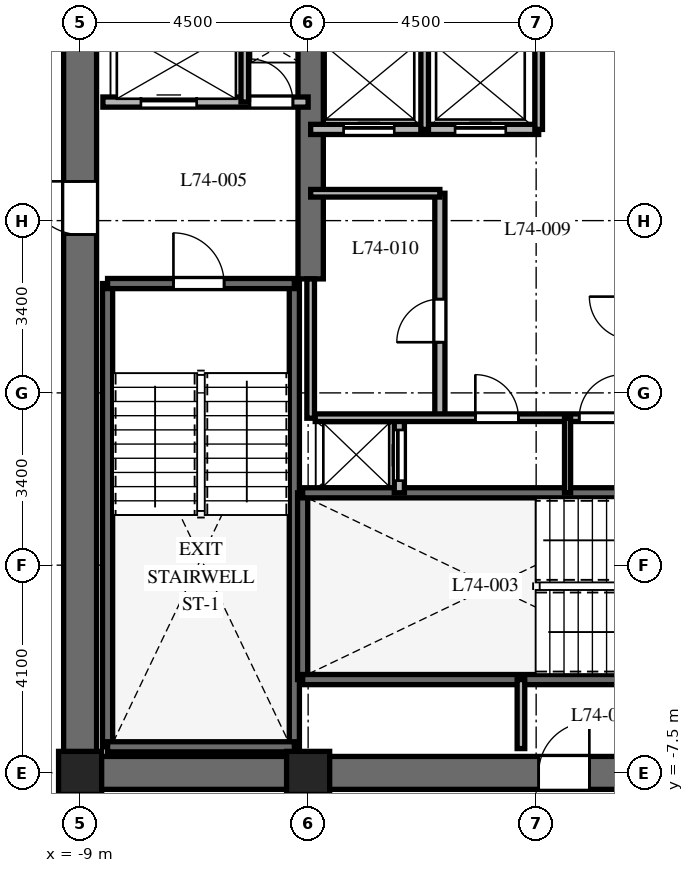
"""IFC4 building model, lengths in metres.
Left out: names, types, materials, properties, quantities, classifications, styles, units other than length and angle.
Written with IfcOpenShell. Run it as: python <this file> out.ifc"""

import sys

from ifc_helpers import new_model, si_unit, direction, frame, frame_2d, origin, origin_2d, place, context, subcontext, project, spatial, rectangle, extrude, element, fill, save


model = new_model("IFC4")
c1 = context("Model", 3, precision=1e-05, world=origin(), true_north=direction((0.0, 1.0)))
c2 = subcontext(c1, "Body", "Model", "MODEL_VIEW")
j1 = project(units=[si_unit("LENGTHUNIT", "METRE"), si_unit("PLANEANGLEUNIT", "RADIAN")], contexts=[c1])
p1 = place(None, origin())
s1 = spatial("IfcSite", under=j1, at=p1, CompositionType="ELEMENT")
p2 = place(p1, origin())
s2 = spatial("IfcBuilding", under=s1, at=p2, CompositionType="ELEMENT")
p3 = place(p2, frame((0.0, 0.0, 297.6)))
s3 = spatial("IfcBuildingStorey", under=s2, at=p3, CompositionType="ELEMENT", Elevation=297.6)
p4 = place(p3, frame((-9.325, -7.5, 0.0), z_axis=(0.0, 0.0, 1.0), x_axis=(1.0, 0.0, 0.0)))
e1 = element("IfcWall", 1, at=p4, inside=s3, PredefinedType="SHEAR", context=c2, shape_type="SweptSolid", body=[
    extrude(rectangle(XDim=18.65, YDim=0.65, at=frame_2d((9.325, 0.0))), origin(), (0.0, 0.0, 1.0), 3.9),
])
p5 = place(p4, frame((9.375, 0.0, 0.0)))
e2 = element("IfcOpeningElement", 2, at=p5, cuts=e1, PredefinedType="OPENING", context=c2, shape_type="SweptSolid", body=[
    extrude(rectangle(XDim=1.0, YDim=2.15, at=frame_2d((0.5, 1.075))), frame((0.0, 0.335, 0.0), z_axis=(0.0, -1.0, 0.0), x_axis=(1.0, 0.0, 0.0)), (0.0, 0.0, 1.0), 0.67),
])
p6 = place(p3, frame((-9.0, -7.175, 0.0), z_axis=(0.0, 0.0, 1.0), x_axis=(0.0, 1.0, 0.0)))
e3 = element("IfcWall", 3, at=p6, inside=s3, PredefinedType="SHEAR", context=c2, shape_type="SweptSolid", body=[
    extrude(rectangle(XDim=14.35, YDim=0.65, at=frame_2d((7.175, 0.0))), origin(), (0.0, 0.0, 1.0), 3.9),
])
p7 = place(p6, frame((10.3, 0.0, 0.0)))
e4 = element("IfcOpeningElement", 4, at=p7, cuts=e3, PredefinedType="OPENING", context=c2, shape_type="SweptSolid", body=[
    extrude(rectangle(XDim=1.05, YDim=2.15, at=frame_2d((0.525, 1.075))), frame((0.0, 0.335, 0.0), z_axis=(0.0, -1.0, 0.0), x_axis=(1.0, 0.0, 0.0)), (0.0, 0.0, 1.0), 0.67),
])
p8 = place(p3, frame((-4.45, 2.25, 0.0), z_axis=(0.0, 0.0, 1.0), x_axis=(0.0, 1.0, 0.0)))
e5 = element("IfcWall", 5, at=p8, inside=s3, PredefinedType="SHEAR", context=c2, shape_type="SweptSolid", body=[
    extrude(rectangle(XDim=4.925, YDim=0.5, at=frame_2d((2.462, 0.0))), origin(), (0.0, 0.0, 1.0), 3.9),
])
for number, where, z_axis, x_axis in (
    (6, (-8.458, -6.985, 0.0), (0.0, 0.0, 1.0), (0.0, 1.0, 0.0)),
    (7, (-4.772, -6.985, 0.0), (0.0, 0.0, 1.0), (0.0, 1.0, 0.0)),
):
    element("IfcWall", number, at=place(p3, frame(where, z_axis=z_axis, x_axis=x_axis)), inside=s3, PredefinedType="SHEAR", context=c2, shape_type="SweptSolid", body=[
        extrude(rectangle(XDim=9.143, YDim=0.2, at=frame_2d((4.572, 0.0))), origin(), (0.0, 0.0, 1.0), 3.9),
    ])
p9 = place(p3, frame((-8.458, -6.985, 0.0), z_axis=(0.0, 0.0, 1.0), x_axis=(1.0, 0.0, 0.0)))
e8 = element("IfcWall", 8, at=p9, inside=s3, PredefinedType="SHEAR", context=c2, shape_type="SweptSolid", body=[
    extrude(rectangle(XDim=3.686, YDim=0.2, at=frame_2d((1.843, 0.0))), origin(), (0.0, 0.0, 1.0), 3.9),
])
p10 = place(p3, frame((-8.458, 2.158, 0.0), z_axis=(0.0, 0.0, 1.0), x_axis=(1.0, 0.0, 0.0)))
e9 = element("IfcWall", 9, at=p10, inside=s3, PredefinedType="SHEAR", context=c2, shape_type="SweptSolid", body=[
    extrude(rectangle(XDim=3.686, YDim=0.2, at=frame_2d((1.843, 0.0))), origin(), (0.0, 0.0, 1.0), 3.9),
])
p11 = place(p10, frame((1.3, 0.0, 0.0)))
e10 = element("IfcOpeningElement", 10, at=p11, cuts=e9, PredefinedType="OPENING", context=c2, shape_type="SweptSolid", body=[
    extrude(rectangle(XDim=1.0, YDim=2.15, at=frame_2d((0.5, 1.075))), frame((0.0, 0.11, 0.0), z_axis=(0.0, -1.0, 0.0), x_axis=(1.0, 0.0, 0.0)), (0.0, 0.0, 1.0), 0.22),
])
p12 = place(p3, frame((-4.608, -5.658, 0.0), z_axis=(0.0, 0.0, 1.0), x_axis=(0.0, 1.0, 0.0)))
e11 = element("IfcWall", 11, at=p12, inside=s3, PredefinedType="SHEAR", context=c2, shape_type="SweptSolid", body=[
    extrude(rectangle(XDim=3.686, YDim=0.2, at=frame_2d((1.843, 0.0))), origin(), (0.0, 0.0, 1.0), 3.9),
])
p13 = place(p3, frame((-4.608, -5.658, 0.0), z_axis=(0.0, 0.0, 1.0), x_axis=(1.0, 0.0, 0.0)))
e12 = element("IfcWall", 12, at=p13, inside=s3, PredefinedType="SHEAR", context=c2, shape_type="SweptSolid", body=[
    extrude(rectangle(XDim=9.166, YDim=0.2, at=frame_2d((4.583, 0.0))), origin(), (0.0, 0.0, 1.0), 3.9),
])
p14 = place(p13, frame((7.45, 0.0, 0.0)))
e13 = element("IfcOpeningElement", 13, at=p14, cuts=e12, PredefinedType="OPENING", context=c2, shape_type="SweptSolid", body=[
    extrude(rectangle(XDim=1.0, YDim=2.15, at=frame_2d((0.5, 1.075))), frame((0.0, 0.11, 0.0), z_axis=(0.0, -1.0, 0.0), x_axis=(1.0, 0.0, 0.0)), (0.0, 0.0, 1.0), 0.22),
])
p15 = place(p3, frame((-4.608, -1.972, 0.0), z_axis=(0.0, 0.0, 1.0), x_axis=(1.0, 0.0, 0.0)))
e14 = element("IfcWall", 14, at=p15, inside=s3, PredefinedType="SHEAR", context=c2, shape_type="SweptSolid", body=[
    extrude(rectangle(XDim=9.166, YDim=0.2, at=frame_2d((4.583, 0.0))), origin(), (0.0, 0.0, 1.0), 3.9),
])
for number, where, z_axis, x_axis in (
    (15, (-9.0, -7.5, 0.0), (0.0, 0.0, 1.0), (1.0, 0.0, 0.0)),
    (16, (-4.5, -7.5, 0.0), (0.0, 0.0, 1.0), (1.0, 0.0, 0.0)),
):
    element("IfcColumn", number, at=place(p3, frame(where, z_axis=z_axis, x_axis=x_axis)), inside=s3, PredefinedType="COLUMN", context=c2, shape_type="SweptSolid", body=[
        extrude(rectangle(XDim=0.85, YDim=0.85, at=origin_2d()), origin(), (0.0, 0.0, 1.0), 3.9),
    ])
p16 = place(p3, frame((-0.3, -7.02, 0.0), z_axis=(0.0, 0.0, 1.0), x_axis=(0.0, 1.0, 0.0)))
e17 = element("IfcWall", 17, at=p16, inside=s3, PredefinedType="PARTITIONING", context=c2, shape_type="SweptSolid", body=[
    extrude(rectangle(XDim=1.362, YDim=0.15, at=frame_2d((0.681, 0.0))), origin(), (0.0, 0.0, 1.0), 3.6),
])
p17 = place(p3, frame((-8.55, 5.74, 0.0), z_axis=(0.0, 0.0, 1.0), x_axis=(1.0, 0.0, 0.0)))
e18 = element("IfcWall", 18, at=p17, inside=s3, PredefinedType="PARTITIONING", context=c2, shape_type="SweptSolid", body=[
    extrude(rectangle(XDim=4.05, YDim=0.2, at=frame_2d((2.025, 0.0))), origin(), (0.0, 0.0, 1.0), 3.6),
])
p18 = place(p17, frame((0.75, 0.0, 0.0)))
e19 = element("IfcOpeningElement", 19, at=p18, cuts=e18, PredefinedType="OPENING", context=c2, shape_type="SweptSolid", body=[
    extrude(rectangle(XDim=1.1, YDim=2.2, at=frame_2d((0.55, 1.1))), frame((0.0, 0.11, 0.0), z_axis=(0.0, -1.0, 0.0), x_axis=(1.0, 0.0, 0.0)), (0.0, 0.0, 1.0), 0.22),
])
p19 = place(p17, frame((2.9, 0.0, 0.0)))
e20 = element("IfcOpeningElement", 20, at=p19, cuts=e18, PredefinedType="OPENING", context=c2, shape_type="SweptSolid", body=[
    extrude(rectangle(XDim=0.85, YDim=2.03, at=frame_2d((0.425, 1.015))), frame((0.0, 0.11, 0.0), z_axis=(0.0, -1.0, 0.0), x_axis=(1.0, 0.0, 0.0)), (0.0, 0.0, 1.0), 0.22),
])
p20 = place(p3, frame((-5.75, 5.74, 0.0), z_axis=(0.0, 0.0, 1.0), x_axis=(0.0, 1.0, 0.0)))
e21 = element("IfcWall", 21, at=p20, inside=s3, PredefinedType="PARTITIONING", context=c2, shape_type="SweptSolid", body=[
    extrude(rectangle(XDim=1.41, YDim=0.15, at=frame_2d((0.705, 0.0))), origin(), (0.0, 0.0, 1.0), 3.6),
])
p21 = place(p3, frame((-2.7, -1.972, 0.0), z_axis=(0.0, 0.0, 1.0), x_axis=(0.0, 1.0, 0.0)))
e22 = element("IfcWall", 22, at=p21, inside=s3, PredefinedType="PARTITIONING", context=c2, shape_type="SweptSolid", body=[
    extrude(rectangle(XDim=1.472, YDim=0.2, at=frame_2d((0.736, 0.0))), origin(), (0.0, 0.0, 1.0), 3.6),
])
p22 = place(p21, frame((0.24, 0.0, 0.0)))
e23 = element("IfcOpeningElement", 23, at=p22, cuts=e22, PredefinedType="OPENING", context=c2, shape_type="SweptSolid", body=[
    extrude(rectangle(XDim=1.0, YDim=2.2, at=frame_2d((0.5, 1.1))), frame((0.0, 0.11, 0.0), z_axis=(0.0, -1.0, 0.0), x_axis=(1.0, 0.0, 0.0)), (0.0, 0.0, 1.0), 0.22),
])
p23 = place(p3, frame((-4.45, 5.2, 0.0), z_axis=(0.0, 0.0, 1.0), x_axis=(1.0, 0.0, 0.0)))
e24 = element("IfcWall", 24, at=p23, inside=s3, PredefinedType="PARTITIONING", context=c2, shape_type="SweptSolid", body=[
    extrude(rectangle(XDim=4.5, YDim=0.2, at=frame_2d((2.25, 0.0))), origin(), (0.0, 0.0, 1.0), 3.6),
])
p24 = place(p23, frame((0.65, 0.0, 0.0)))
e25 = element("IfcOpeningElement", 25, at=p24, cuts=e24, PredefinedType="OPENING", context=c2, shape_type="SweptSolid", body=[
    extrude(rectangle(XDim=1.0, YDim=2.2, at=frame_2d((0.5, 1.1))), frame((0.0, 0.11, 0.0), z_axis=(0.0, -1.0, 0.0), x_axis=(1.0, 0.0, 0.0)), (0.0, 0.0, 1.0), 0.22),
])
p25 = place(p23, frame((2.85, 0.0, 0.0)))
e26 = element("IfcOpeningElement", 26, at=p25, cuts=e24, PredefinedType="OPENING", context=c2, shape_type="SweptSolid", body=[
    extrude(rectangle(XDim=1.0, YDim=2.2, at=frame_2d((0.5, 1.1))), frame((0.0, 0.11, 0.0), z_axis=(0.0, -1.0, 0.0), x_axis=(1.0, 0.0, 0.0)), (0.0, 0.0, 1.0), 0.22),
])
p26 = place(p3, frame((-2.2, 5.2, 0.0), z_axis=(0.0, 0.0, 1.0), x_axis=(0.0, 1.0, 0.0)))
e27 = element("IfcWall", 27, at=p26, inside=s3, PredefinedType="PARTITIONING", context=c2, shape_type="SweptSolid", body=[
    extrude(rectangle(XDim=1.85, YDim=0.15, at=frame_2d((0.925, 0.0))), origin(), (0.0, 0.0, 1.0), 3.6),
])
p27 = place(p3, frame((0.05, 5.2, 0.0), z_axis=(0.0, 0.0, 1.0), x_axis=(0.0, 1.0, 0.0)))
e28 = element("IfcWall", 28, at=p27, inside=s3, PredefinedType="PARTITIONING", context=c2, shape_type="SweptSolid", body=[
    extrude(rectangle(XDim=1.95, YDim=0.15, at=frame_2d((0.975, 0.0))), origin(), (0.0, 0.0, 1.0), 3.6),
])
p28 = place(p3, frame((-4.45, -0.5, 0.0), z_axis=(0.0, 0.0, 1.0), x_axis=(0.0, 1.0, 0.0)))
e29 = element("IfcWall", 29, at=p28, inside=s3, PredefinedType="PARTITIONING", context=c2, shape_type="SweptSolid", body=[
    extrude(rectangle(XDim=2.75, YDim=0.15, at=frame_2d((1.375, 0.0))), origin(), (0.0, 0.0, 1.0), 3.6),
])
p29 = place(p3, frame((-1.9, -0.5, 0.0), z_axis=(0.0, 0.0, 1.0), x_axis=(0.0, 1.0, 0.0)))
e30 = element("IfcWall", 30, at=p29, inside=s3, PredefinedType="PARTITIONING", context=c2, shape_type="SweptSolid", body=[
    extrude(rectangle(XDim=4.44, YDim=0.2, at=frame_2d((2.22, 0.0))), origin(), (0.0, 0.0, 1.0), 3.6),
])
p30 = place(p29, frame((1.5, 0.0, 0.0)))
e31 = element("IfcOpeningElement", 31, at=p30, cuts=e30, PredefinedType="OPENING", context=c2, shape_type="SweptSolid", body=[
    extrude(rectangle(XDim=0.85, YDim=2.03, at=frame_2d((0.425, 1.015))), frame((0.0, 0.11, 0.0), z_axis=(0.0, -1.0, 0.0), x_axis=(1.0, 0.0, 0.0)), (0.0, 0.0, 1.0), 0.22),
])
p31 = place(p3, frame((-4.45, 3.94, 0.0), z_axis=(0.0, 0.0, 1.0), x_axis=(1.0, 0.0, 0.0)))
e32 = element("IfcWall", 32, at=p31, inside=s3, PredefinedType="PARTITIONING", context=c2, shape_type="SweptSolid", body=[
    extrude(rectangle(XDim=2.55, YDim=0.15, at=frame_2d((1.275, 0.0))), origin(), (0.0, 0.0, 1.0), 3.6),
])
p32 = place(p3, frame((-4.36, -0.49, 0.0), z_axis=(0.0, 0.0, 1.0), x_axis=(1.0, 0.0, 0.0)))
e33 = element("IfcWall", 33, at=p32, inside=s3, PredefinedType="PARTITIONING", context=c2, shape_type="SweptSolid", body=[
    extrude(rectangle(XDim=8.72, YDim=0.15, at=frame_2d((4.36, 0.0))), origin(), (0.0, 0.0, 1.0), 3.6),
])
p33 = place(p32, frame((3.16, 0.0, 0.0)))
e34 = element("IfcOpeningElement", 34, at=p33, cuts=e33, PredefinedType="OPENING", context=c2, shape_type="SweptSolid", body=[
    extrude(rectangle(XDim=0.85, YDim=2.03, at=frame_2d((0.425, 1.015))), frame((0.0, 0.085, 0.0), z_axis=(0.0, -1.0, 0.0), x_axis=(1.0, 0.0, 0.0)), (0.0, 0.0, 1.0), 0.17),
])
p34 = place(p32, frame((5.21, 0.0, 0.0)))
e35 = element("IfcOpeningElement", 35, at=p34, cuts=e33, PredefinedType="OPENING", context=c2, shape_type="SweptSolid", body=[
    extrude(rectangle(XDim=0.85, YDim=2.03, at=frame_2d((0.425, 1.015))), frame((0.0, 0.085, 0.0), z_axis=(0.0, -1.0, 0.0), x_axis=(1.0, 0.0, 0.0)), (0.0, 0.0, 1.0), 0.17),
])
p35 = place(p3, frame((0.62, -1.972, 0.0), z_axis=(0.0, 0.0, 1.0), x_axis=(0.0, 1.0, 0.0)))
e36 = element("IfcWall", 36, at=p35, inside=s3, PredefinedType="PARTITIONING", context=c2, shape_type="SweptSolid", body=[
    extrude(rectangle(XDim=1.472, YDim=0.12, at=frame_2d((0.736, 0.0))), origin(), (0.0, 0.0, 1.0), 3.6),
])
p36 = place(p11, origin())
e37 = element("IfcDoor", 37, at=p36, inside=s3, OperationType="SINGLE_SWING_LEFT", PredefinedType="DOOR", context=c2, shape_type="SweptSolid", body=[
    extrude(rectangle(XDim=1.0, YDim=2.15, at=frame_2d((0.5, 1.075))), frame((0.0, 0.025, 0.0), z_axis=(0.0, -1.0, 0.0), x_axis=(1.0, 0.0, 0.0)), (0.0, 0.0, 1.0), 0.05),
])
fill(e10, e37)
p37 = place(p5, origin())
e38 = element("IfcDoor", 38, at=p37, inside=s3, OperationType="SINGLE_SWING_RIGHT", PredefinedType="DOOR", context=c2, shape_type="SweptSolid", body=[
    extrude(rectangle(XDim=1.0, YDim=2.15, at=frame_2d((0.5, 1.075))), frame((0.0, 0.025, 0.0), z_axis=(0.0, -1.0, 0.0), x_axis=(1.0, 0.0, 0.0)), (0.0, 0.0, 1.0), 0.05),
])
fill(e2, e38)
p38 = place(p7, origin())
e39 = element("IfcDoor", 39, at=p38, inside=s3, OperationType="SINGLE_SWING_RIGHT", PredefinedType="DOOR", context=c2, shape_type="SweptSolid", body=[
    extrude(rectangle(XDim=1.05, YDim=2.15, at=frame_2d((0.525, 1.075))), frame((0.0, 0.025, 0.0), z_axis=(0.0, -1.0, 0.0), x_axis=(1.0, 0.0, 0.0)), (0.0, 0.0, 1.0), 0.05),
])
fill(e4, e39)
p39 = place(p18, origin())
e40 = element("IfcDoor", 40, at=p39, inside=s3, OperationType="SLIDING_TO_LEFT", PredefinedType="DOOR", context=c2, shape_type="SweptSolid", body=[
    extrude(rectangle(XDim=1.1, YDim=2.2, at=frame_2d((0.55, 1.1))), frame((0.0, 0.025, 0.0), z_axis=(0.0, -1.0, 0.0), x_axis=(1.0, 0.0, 0.0)), (0.0, 0.0, 1.0), 0.05),
])
fill(e19, e40)
p40 = place(p19, origin())
e41 = element("IfcDoor", 41, at=p40, inside=s3, OperationType="SINGLE_SWING_LEFT", PredefinedType="DOOR", context=c2, shape_type="SweptSolid", body=[
    extrude(rectangle(XDim=0.85, YDim=2.03, at=frame_2d((0.425, 1.015))), frame((0.0, 0.025, 0.0), z_axis=(0.0, -1.0, 0.0), x_axis=(1.0, 0.0, 0.0)), (0.0, 0.0, 1.0), 0.05),
])
fill(e20, e41)
p41 = place(p22, origin())
e42 = element("IfcDoor", 42, at=p41, inside=s3, OperationType="SLIDING_TO_LEFT", PredefinedType="DOOR", context=c2, shape_type="SweptSolid", body=[
    extrude(rectangle(XDim=1.0, YDim=2.2, at=frame_2d((0.5, 1.1))), frame((0.0, 0.025, 0.0), z_axis=(0.0, -1.0, 0.0), x_axis=(1.0, 0.0, 0.0)), (0.0, 0.0, 1.0), 0.05),
])
fill(e23, e42)
p42 = place(p24, origin())
e43 = element("IfcDoor", 43, at=p42, inside=s3, OperationType="SLIDING_TO_LEFT", PredefinedType="DOOR", context=c2, shape_type="SweptSolid", body=[
    extrude(rectangle(XDim=1.0, YDim=2.2, at=frame_2d((0.5, 1.1))), frame((0.0, 0.025, 0.0), z_axis=(0.0, -1.0, 0.0), x_axis=(1.0, 0.0, 0.0)), (0.0, 0.0, 1.0), 0.05),
])
fill(e25, e43)
p43 = place(p25, origin())
e44 = element("IfcDoor", 44, at=p43, inside=s3, OperationType="SLIDING_TO_RIGHT", PredefinedType="DOOR", context=c2, shape_type="SweptSolid", body=[
    extrude(rectangle(XDim=1.0, YDim=2.2, at=frame_2d((0.5, 1.1))), frame((0.0, 0.025, 0.0), z_axis=(0.0, -1.0, 0.0), x_axis=(1.0, 0.0, 0.0)), (0.0, 0.0, 1.0), 0.05),
])
fill(e26, e44)
p44 = place(p30, origin())
e45 = element("IfcDoor", 45, at=p44, inside=s3, OperationType="SINGLE_SWING_LEFT", PredefinedType="DOOR", context=c2, shape_type="SweptSolid", body=[
    extrude(rectangle(XDim=0.85, YDim=2.03, at=frame_2d((0.425, 1.015))), frame((0.0, 0.025, 0.0), z_axis=(0.0, -1.0, 0.0), x_axis=(1.0, 0.0, 0.0)), (0.0, 0.0, 1.0), 0.05),
])
fill(e31, e45)
p45 = place(p33, origin())
e46 = element("IfcDoor", 46, at=p45, inside=s3, OperationType="SINGLE_SWING_LEFT", PredefinedType="DOOR", context=c2, shape_type="SweptSolid", body=[
    extrude(rectangle(XDim=0.85, YDim=2.03, at=frame_2d((0.425, 1.015))), frame((0.0, 0.025, 0.0), z_axis=(0.0, -1.0, 0.0), x_axis=(1.0, 0.0, 0.0)), (0.0, 0.0, 1.0), 0.05),
])
fill(e34, e46)
p46 = place(p34, origin())
e47 = element("IfcDoor", 47, at=p46, inside=s3, OperationType="SINGLE_SWING_RIGHT", PredefinedType="DOOR", context=c2, shape_type="SweptSolid", body=[
    extrude(rectangle(XDim=0.85, YDim=2.03, at=frame_2d((0.425, 1.015))), frame((0.0, 0.025, 0.0), z_axis=(0.0, -1.0, 0.0), x_axis=(1.0, 0.0, 0.0)), (0.0, 0.0, 1.0), 0.05),
])
fill(e35, e47)
save(model, sys.argv[1])
